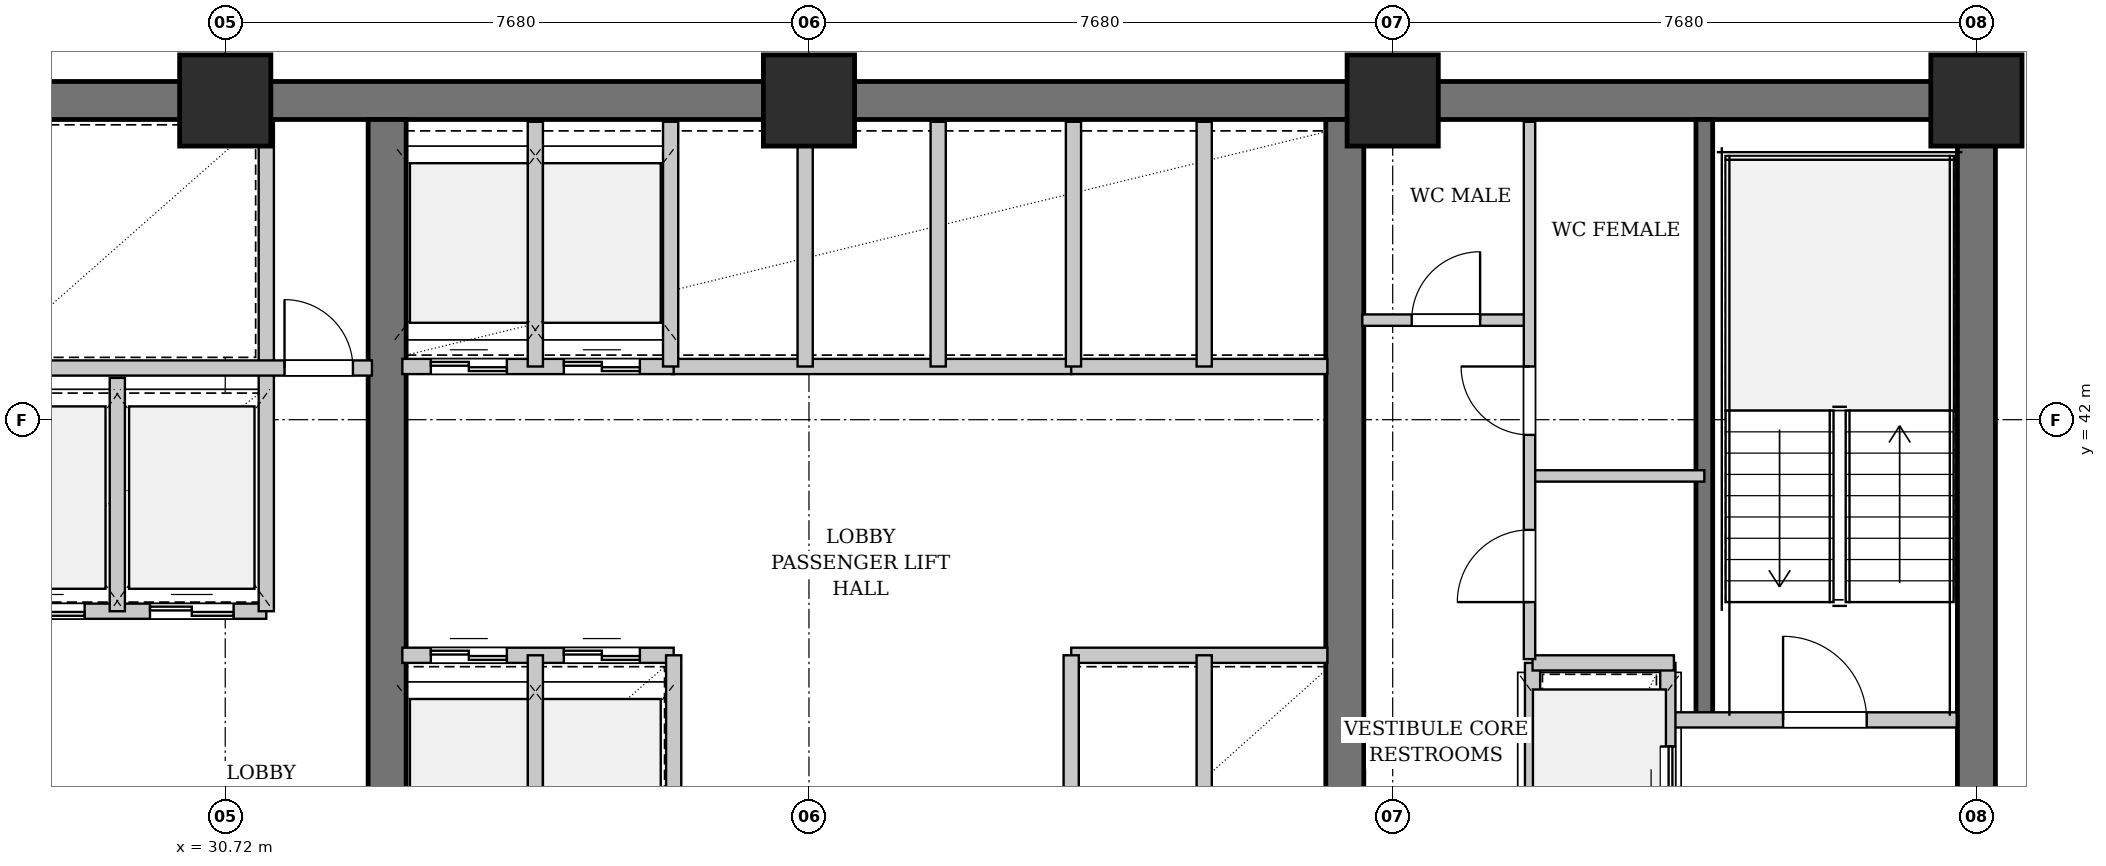
"""IFC4 building model, lengths in metres.
Left out: names, types, materials, properties, quantities, classifications, styles, units other than length and angle.
Written with IfcOpenShell. Run it as: python <this file> out.ifc"""

import sys

from ifc_helpers import new_model, si_unit, direction, frame, frame_2d, origin, origin_2d, place, context, subcontext, project, spatial, rectangle, extrude, element, fill, save


model = new_model("IFC4")
c1 = context("Model", 3, precision=1e-05, world=origin(), true_north=direction((0.0, 1.0)))
c2 = subcontext(c1, "Body", "Model", "MODEL_VIEW")
j1 = project(units=[si_unit("LENGTHUNIT", "METRE"), si_unit("PLANEANGLEUNIT", "RADIAN")], contexts=[c1])
p1 = place(None, origin())
s1 = spatial("IfcSite", under=j1, at=p1, CompositionType="ELEMENT")
p2 = place(p1, origin())
s2 = spatial("IfcBuilding", under=s1, at=p2, CompositionType="ELEMENT")
p3 = place(p2, frame((0.0, 0.0, 37.2)))
s3 = spatial("IfcBuildingStorey", under=s2, at=p3, CompositionType="ELEMENT", Elevation=37.2)
p4 = place(p3, frame((22.79, 46.2, 0.0), z_axis=(0.0, 0.0, 1.0), x_axis=(1.0, 0.0, 0.0)))
e1 = element("IfcWall", 1, at=p4, inside=s3, PredefinedType="SHEAR", context=c2, shape_type="SweptSolid", body=[
    extrude(rectangle(XDim=31.22, YDim=0.5, at=frame_2d((15.61, 0.0))), origin(), (0.0, 0.0, 1.0), 3.18),
])
for number, where, z_axis, x_axis in (
    (2, (32.85, 35.65, 0.0), (0.0, 0.0, 1.0), (0.0, 1.0, 0.0)),
    (3, (45.45, 35.65, 0.0), (0.0, 0.0, 1.0), (0.0, 1.0, 0.0)),
    (4, (53.76, 35.65, 0.0), (0.0, 0.0, 1.0), (0.0, 1.0, 0.0)),
):
    element("IfcWall", number, at=place(p3, frame(where, z_axis=z_axis, x_axis=x_axis)), inside=s3, PredefinedType="SHEAR", context=c2, shape_type="SweptSolid", body=[
        extrude(rectangle(XDim=10.3, YDim=0.5, at=frame_2d((5.15, 0.0))), origin(), (0.0, 0.0, 1.0), 3.18),
    ])
p5 = place(p3, frame((50.18, 38.05, 0.0), z_axis=(0.0, 0.0, 1.0), x_axis=(0.0, 1.0, 0.0)))
e5 = element("IfcWall", 5, at=p5, inside=s3, PredefinedType="SHEAR", context=c2, shape_type="SweptSolid", body=[
    extrude(rectangle(XDim=7.9, YDim=0.22, at=frame_2d((3.95, 0.0))), origin(), (0.0, 0.0, 1.0), 3.18),
])
for number, where, z_axis, x_axis in (
    (6, (30.72, 46.2, 0.0), (0.0, 0.0, 1.0), (1.0, 0.0, 0.0)),
    (7, (38.4, 46.2, 0.0), (0.0, 0.0, 1.0), (1.0, 0.0, 0.0)),
    (8, (46.08, 46.2, 0.0), (0.0, 0.0, 1.0), (1.0, 0.0, 0.0)),
    (9, (53.76, 46.2, 0.0), (0.0, 0.0, 1.0), (1.0, 0.0, 0.0)),
):
    element("IfcColumn", number, at=place(p3, frame(where, z_axis=z_axis, x_axis=x_axis)), inside=s3, PredefinedType="COLUMN", context=c2, shape_type="SweptSolid", body=[
        extrude(rectangle(XDim=1.2, YDim=1.2, at=origin_2d()), origin(), (0.0, 0.0, 1.0), 3.4),
    ])
p6 = place(p3, frame((27.32, 39.48, 0.0), z_axis=(0.0, 0.0, 1.0), x_axis=(1.0, 0.0, 0.0)))
e10 = element("IfcWall", 10, at=p6, inside=s3, PredefinedType="PARTITIONING", context=c2, shape_type="SweptSolid", body=[
    extrude(rectangle(XDim=3.94, YDim=0.2, at=frame_2d((1.97, 0.0))), origin(), (0.0, 0.0, 1.0), 3.18),
])
p7 = place(p6, frame((0.45, 0.0, 0.0)))
e11 = element("IfcOpeningElement", 11, at=p7, cuts=e10, PredefinedType="OPENING", context=c2, shape_type="SweptSolid", body=[
    extrude(rectangle(XDim=1.1, YDim=2.2, at=frame_2d((0.55, 1.1))), frame((0.0, 0.11, 0.0), z_axis=(0.0, -1.0, 0.0), x_axis=(1.0, 0.0, 0.0)), (0.0, 0.0, 1.0), 0.22),
])
p8 = place(p6, frame((2.41, 0.0, 0.0)))
e12 = element("IfcOpeningElement", 12, at=p8, cuts=e10, PredefinedType="OPENING", context=c2, shape_type="SweptSolid", body=[
    extrude(rectangle(XDim=1.1, YDim=2.2, at=frame_2d((0.55, 1.1))), frame((0.0, 0.11, 0.0), z_axis=(0.0, -1.0, 0.0), x_axis=(1.0, 0.0, 0.0)), (0.0, 0.0, 1.0), 0.22),
])
p9 = place(p3, frame((29.3, 39.48, 0.0), z_axis=(0.0, 0.0, 1.0), x_axis=(0.0, 1.0, 0.0)))
e13 = element("IfcWall", 13, at=p9, inside=s3, PredefinedType="PARTITIONING", context=c2, shape_type="SweptSolid", body=[
    extrude(rectangle(XDim=3.07, YDim=0.2, at=frame_2d((1.535, 0.0))), origin(), (0.0, 0.0, 1.0), 3.18),
])
p10 = place(p3, frame((31.26, 39.48, 0.0), z_axis=(0.0, 0.0, 1.0), x_axis=(0.0, 1.0, 0.0)))
e14 = element("IfcWall", 14, at=p10, inside=s3, PredefinedType="PARTITIONING", context=c2, shape_type="SweptSolid", body=[
    extrude(rectangle(XDim=6.44, YDim=0.2, at=frame_2d((3.22, 0.0))), origin(), (0.0, 0.0, 1.0), 3.18),
])
p11 = place(p3, frame((27.32, 42.68, 0.0), z_axis=(0.0, 0.0, 1.0), x_axis=(1.0, 0.0, 0.0)))
e15 = element("IfcWall", 15, at=p11, inside=s3, PredefinedType="PARTITIONING", context=c2, shape_type="SweptSolid", body=[
    extrude(rectangle(XDim=5.33, YDim=0.2, at=frame_2d((2.665, 0.0))), origin(), (0.0, 0.0, 1.0), 3.18),
])
p12 = place(p11, frame((4.18, 0.0, 0.0)))
e16 = element("IfcOpeningElement", 16, at=p12, cuts=e15, PredefinedType="OPENING", context=c2, shape_type="SweptSolid", body=[
    extrude(rectangle(XDim=0.9, YDim=2.15, at=frame_2d((0.45, 1.075))), frame((0.0, 0.11, 0.0), z_axis=(0.0, -1.0, 0.0), x_axis=(1.0, 0.0, 0.0)), (0.0, 0.0, 1.0), 0.22),
])
p13 = place(p3, frame((36.6, 42.7, 0.0), z_axis=(0.0, 0.0, 1.0), x_axis=(1.0, 0.0, 0.0)))
e17 = element("IfcWall", 17, at=p13, inside=s3, PredefinedType="PARTITIONING", context=c2, shape_type="SweptSolid", body=[
    extrude(rectangle(XDim=5.25, YDim=0.2, at=frame_2d((2.625, 0.0))), origin(), (0.0, 0.0, 1.0), 3.18),
])
p14 = place(p3, frame((38.35, 42.7, 0.0), z_axis=(0.0, 0.0, 1.0), x_axis=(0.0, 1.0, 0.0)))
e18 = element("IfcWall", 18, at=p14, inside=s3, PredefinedType="PARTITIONING", context=c2, shape_type="SweptSolid", body=[
    extrude(rectangle(XDim=3.22, YDim=0.2, at=frame_2d((1.61, 0.0))), origin(), (0.0, 0.0, 1.0), 2.475),
])
p15 = place(p3, frame((40.1, 42.7, 0.0), z_axis=(0.0, 0.0, 1.0), x_axis=(0.0, 1.0, 0.0)))
e19 = element("IfcWall", 19, at=p15, inside=s3, PredefinedType="PARTITIONING", context=c2, shape_type="SweptSolid", body=[
    extrude(rectangle(XDim=3.22, YDim=0.2, at=frame_2d((1.61, 0.0))), origin(), (0.0, 0.0, 1.0), 3.18),
])
p16 = place(p3, frame((33.05, 38.9, 0.0), z_axis=(0.0, 0.0, 1.0), x_axis=(1.0, 0.0, 0.0)))
e20 = element("IfcWall", 20, at=p16, inside=s3, PredefinedType="PARTITIONING", context=c2, shape_type="SweptSolid", body=[
    extrude(rectangle(XDim=3.57, YDim=0.2, at=frame_2d((1.785, 0.0))), origin(), (0.0, 0.0, 1.0), 3.18),
])
p17 = place(p16, frame((0.375, 0.0, 0.0)))
e21 = element("IfcOpeningElement", 21, at=p17, cuts=e20, PredefinedType="OPENING", context=c2, shape_type="SweptSolid", body=[
    extrude(rectangle(XDim=1.0, YDim=2.2, at=frame_2d((0.5, 1.1))), frame((0.0, 0.11, 0.0), z_axis=(0.0, -1.0, 0.0), x_axis=(1.0, 0.0, 0.0)), (0.0, 0.0, 1.0), 0.22),
])
p18 = place(p16, frame((2.125, 0.0, 0.0)))
e22 = element("IfcOpeningElement", 22, at=p18, cuts=e20, PredefinedType="OPENING", context=c2, shape_type="SweptSolid", body=[
    extrude(rectangle(XDim=1.0, YDim=2.2, at=frame_2d((0.5, 1.1))), frame((0.0, 0.11, 0.0), z_axis=(0.0, -1.0, 0.0), x_axis=(1.0, 0.0, 0.0)), (0.0, 0.0, 1.0), 0.22),
])
p19 = place(p3, frame((33.05, 42.7, 0.0), z_axis=(0.0, 0.0, 1.0), x_axis=(1.0, 0.0, 0.0)))
e23 = element("IfcWall", 23, at=p19, inside=s3, PredefinedType="PARTITIONING", context=c2, shape_type="SweptSolid", body=[
    extrude(rectangle(XDim=3.57, YDim=0.2, at=frame_2d((1.785, 0.0))), origin(), (0.0, 0.0, 1.0), 3.18),
])
p20 = place(p19, frame((0.375, 0.0, 0.0)))
e24 = element("IfcOpeningElement", 24, at=p20, cuts=e23, PredefinedType="OPENING", context=c2, shape_type="SweptSolid", body=[
    extrude(rectangle(XDim=1.0, YDim=2.2, at=frame_2d((0.5, 1.1))), frame((0.0, 0.11, 0.0), z_axis=(0.0, -1.0, 0.0), x_axis=(1.0, 0.0, 0.0)), (0.0, 0.0, 1.0), 0.22),
])
p21 = place(p19, frame((2.125, 0.0, 0.0)))
e25 = element("IfcOpeningElement", 25, at=p21, cuts=e23, PredefinedType="OPENING", context=c2, shape_type="SweptSolid", body=[
    extrude(rectangle(XDim=1.0, YDim=2.2, at=frame_2d((0.5, 1.1))), frame((0.0, 0.11, 0.0), z_axis=(0.0, -1.0, 0.0), x_axis=(1.0, 0.0, 0.0)), (0.0, 0.0, 1.0), 0.22),
])
p22 = place(p3, frame((34.8, 35.65, 0.0), z_axis=(0.0, 0.0, 1.0), x_axis=(0.0, 1.0, 0.0)))
e26 = element("IfcWall", 26, at=p22, inside=s3, PredefinedType="PARTITIONING", context=c2, shape_type="SweptSolid", body=[
    extrude(rectangle(XDim=3.25, YDim=0.2, at=frame_2d((1.625, 0.0))), origin(), (0.0, 0.0, 1.0), 3.18),
])
p23 = place(p3, frame((34.8, 42.7, 0.0), z_axis=(0.0, 0.0, 1.0), x_axis=(0.0, 1.0, 0.0)))
e27 = element("IfcWall", 27, at=p23, inside=s3, PredefinedType="PARTITIONING", context=c2, shape_type="SweptSolid", body=[
    extrude(rectangle(XDim=3.22, YDim=0.2, at=frame_2d((1.61, 0.0))), origin(), (0.0, 0.0, 1.0), 3.18),
])
p24 = place(p3, frame((36.62, 35.5, 0.0), z_axis=(0.0, 0.0, 1.0), x_axis=(0.0, 1.0, 0.0)))
e28 = element("IfcWall", 28, at=p24, inside=s3, PredefinedType="PARTITIONING", context=c2, shape_type="SweptSolid", body=[
    extrude(rectangle(XDim=3.4, YDim=0.2, at=frame_2d((1.7, 0.0))), origin(), (0.0, 0.0, 1.0), 3.18),
])
p25 = place(p3, frame((36.58, 42.7, 0.0), z_axis=(0.0, 0.0, 1.0), x_axis=(0.0, 1.0, 0.0)))
e29 = element("IfcWall", 29, at=p25, inside=s3, PredefinedType="PARTITIONING", context=c2, shape_type="SweptSolid", body=[
    extrude(rectangle(XDim=3.22, YDim=0.2, at=frame_2d((1.61, 0.0))), origin(), (0.0, 0.0, 1.0), 3.18),
])
for number, where, z_axis, x_axis in (
    (30, (41.85, 38.9, 0.0), (0.0, 0.0, 1.0), (1.0, 0.0, 0.0)),
    (31, (41.85, 42.7, 0.0), (0.0, 0.0, 1.0), (1.0, 0.0, 0.0)),
):
    element("IfcWall", number, at=place(p3, frame(where, z_axis=z_axis, x_axis=x_axis)), inside=s3, PredefinedType="PARTITIONING", context=c2, shape_type="SweptSolid", body=[
        extrude(rectangle(XDim=3.37, YDim=0.2, at=frame_2d((1.685, 0.0))), origin(), (0.0, 0.0, 1.0), 3.18),
    ])
p26 = place(p3, frame((43.6, 35.65, 0.0), z_axis=(0.0, 0.0, 1.0), x_axis=(0.0, 1.0, 0.0)))
e32 = element("IfcWall", 32, at=p26, inside=s3, PredefinedType="PARTITIONING", context=c2, shape_type="SweptSolid", body=[
    extrude(rectangle(XDim=3.25, YDim=0.2, at=frame_2d((1.625, 0.0))), origin(), (0.0, 0.0, 1.0), 3.18),
])
p27 = place(p3, frame((43.6, 42.7, 0.0), z_axis=(0.0, 0.0, 1.0), x_axis=(0.0, 1.0, 0.0)))
e33 = element("IfcWall", 33, at=p27, inside=s3, PredefinedType="PARTITIONING", context=c2, shape_type="SweptSolid", body=[
    extrude(rectangle(XDim=3.22, YDim=0.2, at=frame_2d((1.61, 0.0))), origin(), (0.0, 0.0, 1.0), 3.18),
])
p28 = place(p3, frame((41.85, 35.5, 0.0), z_axis=(0.0, 0.0, 1.0), x_axis=(0.0, 1.0, 0.0)))
e34 = element("IfcWall", 34, at=p28, inside=s3, PredefinedType="PARTITIONING", context=c2, shape_type="SweptSolid", body=[
    extrude(rectangle(XDim=3.4, YDim=0.2, at=frame_2d((1.7, 0.0))), origin(), (0.0, 0.0, 1.0), 3.18),
])
p29 = place(p3, frame((41.88, 42.7, 0.0), z_axis=(0.0, 0.0, 1.0), x_axis=(0.0, 1.0, 0.0)))
e35 = element("IfcWall", 35, at=p29, inside=s3, PredefinedType="PARTITIONING", context=c2, shape_type="SweptSolid", body=[
    extrude(rectangle(XDim=3.22, YDim=0.2, at=frame_2d((1.61, 0.0))), origin(), (0.0, 0.0, 1.0), 3.18),
])
p30 = place(p3, frame((49.78, 38.05, 0.0), z_axis=(0.0, 0.0, 1.0), x_axis=(1.0, 0.0, 0.0)))
e36 = element("IfcWall", 36, at=p30, inside=s3, PredefinedType="PARTITIONING", context=c2, shape_type="SweptSolid", body=[
    extrude(rectangle(XDim=3.72, YDim=0.2, at=frame_2d((1.86, 0.0))), origin(), (0.0, 0.0, 1.0), 3.18),
])
p31 = place(p30, frame((1.436, 0.0, 0.0)))
e37 = element("IfcOpeningElement", 37, at=p31, cuts=e36, PredefinedType="OPENING", context=c2, shape_type="SweptSolid", body=[
    extrude(rectangle(XDim=1.1, YDim=2.15, at=frame_2d((0.55, 1.075))), frame((0.0, 0.11, 0.0), z_axis=(0.0, -1.0, 0.0), x_axis=(1.0, 0.0, 0.0)), (0.0, 0.0, 1.0), 0.22),
])
p32 = place(p3, frame((49.7, 35.65, 0.0), z_axis=(0.0, 0.0, 1.0), x_axis=(0.0, 1.0, 0.0)))
e38 = element("IfcWall", 38, at=p32, inside=s3, PredefinedType="PARTITIONING", context=c2, shape_type="SweptSolid", body=[
    extrude(rectangle(XDim=3.15, YDim=0.2, at=frame_2d((1.575, 0.0))), origin(), (0.0, 0.0, 1.0), 3.18),
])
p33 = place(p32, frame((0.85, 0.0, 0.0)))
e39 = element("IfcOpeningElement", 39, at=p33, cuts=e38, PredefinedType="OPENING", context=c2, shape_type="SweptSolid", body=[
    extrude(rectangle(XDim=1.2, YDim=2.2, at=frame_2d((0.6, 1.1))), frame((0.0, 0.11, 0.0), z_axis=(0.0, -1.0, 0.0), x_axis=(1.0, 0.0, 0.0)), (0.0, 0.0, 1.0), 0.22),
])
p34 = place(p3, frame((47.92, 35.65, 0.0), z_axis=(0.0, 0.0, 1.0), x_axis=(0.0, 1.0, 0.0)))
e40 = element("IfcWall", 40, at=p34, inside=s3, PredefinedType="PARTITIONING", context=c2, shape_type="SweptSolid", body=[
    extrude(rectangle(XDim=3.15, YDim=0.2, at=frame_2d((1.575, 0.0))), origin(), (0.0, 0.0, 1.0), 3.18),
])
p35 = place(p3, frame((47.92, 38.8, 0.0), z_axis=(0.0, 0.0, 1.0), x_axis=(1.0, 0.0, 0.0)))
e41 = element("IfcWall", 41, at=p35, inside=s3, PredefinedType="PARTITIONING", context=c2, shape_type="SweptSolid", body=[
    extrude(rectangle(XDim=1.86, YDim=0.2, at=frame_2d((0.93, 0.0))), origin(), (0.0, 0.0, 1.0), 3.18),
])
p36 = place(p3, frame((45.68, 43.31, 0.0), z_axis=(0.0, 0.0, 1.0), x_axis=(1.0, 0.0, 0.0)))
e42 = element("IfcWall", 42, at=p36, inside=s3, PredefinedType="PARTITIONING", context=c2, shape_type="SweptSolid", body=[
    extrude(rectangle(XDim=2.2, YDim=0.15, at=frame_2d((1.1, 0.0))), origin(), (0.0, 0.0, 1.0), 3.18),
])
p37 = place(p36, frame((0.65, 0.0, 0.0)))
e43 = element("IfcOpeningElement", 43, at=p37, cuts=e42, PredefinedType="OPENING", context=c2, shape_type="SweptSolid", body=[
    extrude(rectangle(XDim=0.9, YDim=2.15, at=frame_2d((0.45, 1.075))), frame((0.0, 0.085, 0.0), z_axis=(0.0, -1.0, 0.0), x_axis=(1.0, 0.0, 0.0)), (0.0, 0.0, 1.0), 0.17),
])
p38 = place(p3, frame((47.88, 41.26, 0.0), z_axis=(0.0, 0.0, 1.0), x_axis=(1.0, 0.0, 0.0)))
e44 = element("IfcWall", 44, at=p38, inside=s3, PredefinedType="PARTITIONING", context=c2, shape_type="SweptSolid", body=[
    extrude(rectangle(XDim=2.3, YDim=0.15, at=frame_2d((1.15, 0.0))), origin(), (0.0, 0.0, 1.0), 3.18),
])
p39 = place(p3, frame((47.88, 38.85, 0.0), z_axis=(0.0, 0.0, 1.0), x_axis=(0.0, 1.0, 0.0)))
e45 = element("IfcWall", 45, at=p39, inside=s3, PredefinedType="PARTITIONING", context=c2, shape_type="SweptSolid", body=[
    extrude(rectangle(XDim=7.07, YDim=0.15, at=frame_2d((3.535, 0.0))), origin(), (0.0, 0.0, 1.0), 3.18),
])
p40 = place(p39, frame((0.75, 0.0, 0.0)))
e46 = element("IfcOpeningElement", 46, at=p40, cuts=e45, PredefinedType="OPENING", context=c2, shape_type="SweptSolid", body=[
    extrude(rectangle(XDim=0.95, YDim=2.15, at=frame_2d((0.475, 1.075))), frame((0.0, 0.085, 0.0), z_axis=(0.0, -1.0, 0.0), x_axis=(1.0, 0.0, 0.0)), (0.0, 0.0, 1.0), 0.17),
])
p41 = place(p39, frame((2.95, 0.0, 0.0)))
e47 = element("IfcOpeningElement", 47, at=p41, cuts=e45, PredefinedType="OPENING", context=c2, shape_type="SweptSolid", body=[
    extrude(rectangle(XDim=0.9, YDim=2.15, at=frame_2d((0.45, 1.075))), frame((0.0, 0.085, 0.0), z_axis=(0.0, -1.0, 0.0), x_axis=(1.0, 0.0, 0.0)), (0.0, 0.0, 1.0), 0.17),
])
p42 = place(p7, origin())
e48 = element("IfcDoor", 48, at=p42, inside=s3, OperationType="DOUBLE_DOOR_SLIDING", PredefinedType="DOOR", context=c2, shape_type="SweptSolid", body=[
    extrude(rectangle(XDim=1.1, YDim=2.2, at=frame_2d((0.55, 1.1))), frame((0.0, 0.025, 0.0), z_axis=(0.0, -1.0, 0.0), x_axis=(1.0, 0.0, 0.0)), (0.0, 0.0, 1.0), 0.05),
])
fill(e11, e48)
p43 = place(p8, origin())
e49 = element("IfcDoor", 49, at=p43, inside=s3, OperationType="DOUBLE_DOOR_SLIDING", PredefinedType="DOOR", context=c2, shape_type="SweptSolid", body=[
    extrude(rectangle(XDim=1.1, YDim=2.2, at=frame_2d((0.55, 1.1))), frame((0.0, 0.025, 0.0), z_axis=(0.0, -1.0, 0.0), x_axis=(1.0, 0.0, 0.0)), (0.0, 0.0, 1.0), 0.05),
])
fill(e12, e49)
p44 = place(p12, origin())
e50 = element("IfcDoor", 50, at=p44, inside=s3, OperationType="SINGLE_SWING_LEFT", PredefinedType="DOOR", context=c2, shape_type="SweptSolid", body=[
    extrude(rectangle(XDim=0.9, YDim=2.15, at=frame_2d((0.45, 1.075))), frame((0.0, 0.025, 0.0), z_axis=(0.0, -1.0, 0.0), x_axis=(1.0, 0.0, 0.0)), (0.0, 0.0, 1.0), 0.05),
])
fill(e16, e50)
p45 = place(p17, origin())
e51 = element("IfcDoor", 51, at=p45, inside=s3, OperationType="DOUBLE_DOOR_SLIDING", PredefinedType="DOOR", context=c2, shape_type="SweptSolid", body=[
    extrude(rectangle(XDim=1.0, YDim=2.2, at=frame_2d((0.5, 1.1))), frame((0.0, 0.025, 0.0), z_axis=(0.0, -1.0, 0.0), x_axis=(1.0, 0.0, 0.0)), (0.0, 0.0, 1.0), 0.05),
])
fill(e21, e51)
p46 = place(p18, origin())
e52 = element("IfcDoor", 52, at=p46, inside=s3, OperationType="DOUBLE_DOOR_SLIDING", PredefinedType="DOOR", context=c2, shape_type="SweptSolid", body=[
    extrude(rectangle(XDim=1.0, YDim=2.2, at=frame_2d((0.5, 1.1))), frame((0.0, 0.025, 0.0), z_axis=(0.0, -1.0, 0.0), x_axis=(1.0, 0.0, 0.0)), (0.0, 0.0, 1.0), 0.05),
])
fill(e22, e52)
p47 = place(p20, origin())
e53 = element("IfcDoor", 53, at=p47, inside=s3, OperationType="DOUBLE_DOOR_SLIDING", PredefinedType="DOOR", context=c2, shape_type="SweptSolid", body=[
    extrude(rectangle(XDim=1.0, YDim=2.2, at=frame_2d((0.5, 1.1))), frame((0.0, 0.025, 0.0), z_axis=(0.0, -1.0, 0.0), x_axis=(1.0, 0.0, 0.0)), (0.0, 0.0, 1.0), 0.05),
])
fill(e24, e53)
p48 = place(p21, origin())
e54 = element("IfcDoor", 54, at=p48, inside=s3, OperationType="DOUBLE_DOOR_SLIDING", PredefinedType="DOOR", context=c2, shape_type="SweptSolid", body=[
    extrude(rectangle(XDim=1.0, YDim=2.2, at=frame_2d((0.5, 1.1))), frame((0.0, 0.025, 0.0), z_axis=(0.0, -1.0, 0.0), x_axis=(1.0, 0.0, 0.0)), (0.0, 0.0, 1.0), 0.05),
])
fill(e25, e54)
p49 = place(p31, origin())
e55 = element("IfcDoor", 55, at=p49, inside=s3, OperationType="SINGLE_SWING_LEFT", PredefinedType="DOOR", context=c2, shape_type="SweptSolid", body=[
    extrude(rectangle(XDim=1.1, YDim=2.15, at=frame_2d((0.55, 1.075))), frame((0.0, 0.025, 0.0), z_axis=(0.0, -1.0, 0.0), x_axis=(1.0, 0.0, 0.0)), (0.0, 0.0, 1.0), 0.05),
])
fill(e37, e55)
p50 = place(p33, origin())
e56 = element("IfcDoor", 56, at=p50, inside=s3, OperationType="DOUBLE_DOOR_SLIDING", PredefinedType="DOOR", context=c2, shape_type="SweptSolid", body=[
    extrude(rectangle(XDim=1.2, YDim=2.2, at=frame_2d((0.6, 1.1))), frame((0.0, 0.025, 0.0), z_axis=(0.0, -1.0, 0.0), x_axis=(1.0, 0.0, 0.0)), (0.0, 0.0, 1.0), 0.05),
])
fill(e39, e56)
p51 = place(p37, origin())
e57 = element("IfcDoor", 57, at=p51, inside=s3, OperationType="SINGLE_SWING_RIGHT", PredefinedType="DOOR", context=c2, shape_type="SweptSolid", body=[
    extrude(rectangle(XDim=0.9, YDim=2.15, at=frame_2d((0.45, 1.075))), frame((0.0, 0.025, 0.0), z_axis=(0.0, -1.0, 0.0), x_axis=(1.0, 0.0, 0.0)), (0.0, 0.0, 1.0), 0.05),
])
fill(e43, e57)
p52 = place(p40, origin())
e58 = element("IfcDoor", 58, at=p52, inside=s3, OperationType="SINGLE_SWING_LEFT", PredefinedType="DOOR", context=c2, shape_type="SweptSolid", body=[
    extrude(rectangle(XDim=0.95, YDim=2.15, at=frame_2d((0.475, 1.075))), frame((0.0, 0.025, 0.0), z_axis=(0.0, -1.0, 0.0), x_axis=(1.0, 0.0, 0.0)), (0.0, 0.0, 1.0), 0.05),
])
fill(e46, e58)
p53 = place(p41, origin())
e59 = element("IfcDoor", 59, at=p53, inside=s3, OperationType="SINGLE_SWING_RIGHT", PredefinedType="DOOR", context=c2, shape_type="SweptSolid", body=[
    extrude(rectangle(XDim=0.9, YDim=2.15, at=frame_2d((0.45, 1.075))), frame((0.0, 0.025, 0.0), z_axis=(0.0, -1.0, 0.0), x_axis=(1.0, 0.0, 0.0)), (0.0, 0.0, 1.0), 0.05),
])
fill(e47, e59)
save(model, sys.argv[1])
